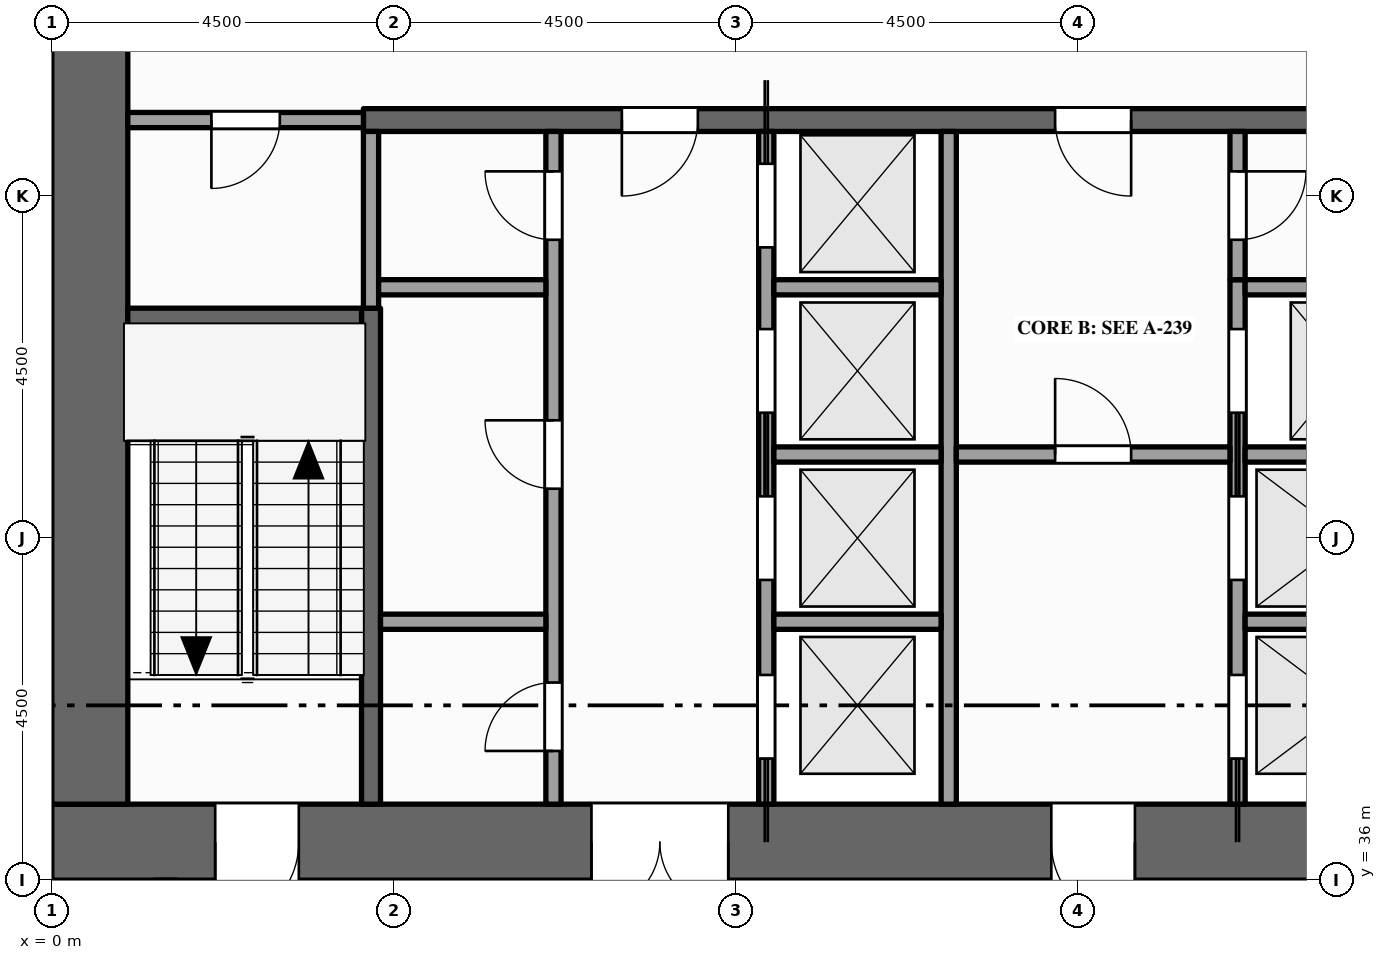
"""IFC4 building model, lengths in metres.
Left out: names, types, materials, properties, quantities, classifications, styles, units other than length and angle.
Written with IfcOpenShell. Run it as: python <this file> out.ifc"""

import sys

from ifc_helpers import new_model, si_unit, direction, frame, frame_2d, origin, place, context, subcontext, project, spatial, rectangle, extrude, element, fill, save


model = new_model("IFC4")
c1 = context("Model", 3, precision=1e-05, world=origin(), true_north=direction((0.0, 1.0)))
c2 = subcontext(c1, "Body", "Model", "MODEL_VIEW")
j1 = project(units=[si_unit("LENGTHUNIT", "METRE"), si_unit("PLANEANGLEUNIT", "RADIAN")], contexts=[c1])
p1 = place(None, origin())
s1 = spatial("IfcSite", under=j1, at=p1, CompositionType="ELEMENT")
p2 = place(p1, origin())
s2 = spatial("IfcBuilding", under=s1, at=p2, CompositionType="ELEMENT")
p3 = place(p2, frame((0.0, 0.0, 215.0)))
s3 = spatial("IfcBuildingStorey", under=s2, at=p3, CompositionType="ELEMENT", Elevation=215.0)
p4 = place(p3, frame((0.0, 36.5, -0.15), z_axis=(0.0, 0.0, 1.0), x_axis=(1.0, 0.0, 0.0)))
e1 = element("IfcWall", 1, at=p4, inside=s3, PredefinedType="SHEAR", context=c2, shape_type="SweptSolid", body=[
    extrude(rectangle(XDim=22.5, YDim=1.0, at=frame_2d((11.25, 0.0))), origin(), (0.0, 0.0, 1.0), 4.0),
])
p5 = place(p4, frame((7.1, 0.0, 0.15)))
e2 = element("IfcOpeningElement", 2, at=p5, cuts=e1, PredefinedType="OPENING", context=c2, shape_type="SweptSolid", body=[
    extrude(rectangle(XDim=1.8, YDim=2.1, at=frame_2d((0.9, 1.05))), frame((0.0, 0.51, 0.0), z_axis=(0.0, -1.0, 0.0), x_axis=(1.0, 0.0, 0.0)), (0.0, 0.0, 1.0), 1.02),
])
p6 = place(p4, frame((13.15, 0.0, 0.15)))
e3 = element("IfcOpeningElement", 3, at=p6, cuts=e1, PredefinedType="OPENING", context=c2, shape_type="SweptSolid", body=[
    extrude(rectangle(XDim=1.1, YDim=2.1, at=frame_2d((0.55, 1.05))), frame((0.0, 0.51, 0.0), z_axis=(0.0, -1.0, 0.0), x_axis=(1.0, 0.0, 0.0)), (0.0, 0.0, 1.0), 1.02),
])
p7 = place(p4, frame((2.15, 0.0, 0.15)))
e4 = element("IfcOpeningElement", 4, at=p7, cuts=e1, PredefinedType="OPENING", context=c2, shape_type="SweptSolid", body=[
    extrude(rectangle(XDim=1.1, YDim=2.1, at=frame_2d((0.55, 1.05))), frame((0.0, 0.51, 0.0), z_axis=(0.0, -1.0, 0.0), x_axis=(1.0, 0.0, 0.0)), (0.0, 0.0, 1.0), 1.02),
])
p8 = place(p4, frame((19.35, 0.0, 0.15)))
e5 = element("IfcOpeningElement", 5, at=p8, cuts=e1, PredefinedType="OPENING", context=c2, shape_type="SweptSolid", body=[
    extrude(rectangle(XDim=1.1, YDim=2.1, at=frame_2d((0.55, 1.05))), frame((0.0, 0.51, 0.0), z_axis=(0.0, -1.0, 0.0), x_axis=(1.0, 0.0, 0.0)), (0.0, 0.0, 1.0), 1.02),
])
p9 = place(p3, frame((0.5, 37.0, -0.15), z_axis=(0.0, 0.0, 1.0), x_axis=(0.0, 1.0, 0.0)))
e6 = element("IfcWall", 6, at=p9, inside=s3, PredefinedType="SHEAR", context=c2, shape_type="SweptSolid", body=[
    extrude(rectangle(XDim=11.5, YDim=1.0, at=frame_2d((5.75, 0.0))), origin(), (0.0, 0.0, 1.0), 4.0),
])
p10 = place(p3, frame((4.2, 37.0, 0.0), z_axis=(0.0, 0.0, 1.0), x_axis=(0.0, 1.0, 0.0)))
e7 = element("IfcWall", 7, at=p10, inside=s3, PredefinedType="SHEAR", context=c2, shape_type="SweptSolid", body=[
    extrude(rectangle(XDim=6.525, YDim=0.25, at=frame_2d((3.262, 0.0))), origin(), (0.0, 0.0, 1.0), 3.85),
])
p11 = place(p3, frame((4.2, 43.525, 0.0), z_axis=(0.0, 0.0, 1.0), x_axis=(0.0, 1.0, 0.0)))
e8 = element("IfcWall", 8, at=p11, inside=s3, PredefinedType="PARTITIONING", context=c2, shape_type="SweptSolid", body=[
    extrude(rectangle(XDim=2.325, YDim=0.2, at=frame_2d((1.163, 0.0))), origin(), (0.0, 0.0, 1.0), 3.85),
])
p12 = place(p3, frame((6.6, 37.0, 0.0), z_axis=(0.0, 0.0, 1.0), x_axis=(0.0, 1.0, 0.0)))
e9 = element("IfcWall", 9, at=p12, inside=s3, PredefinedType="PARTITIONING", context=c2, shape_type="SweptSolid", body=[
    extrude(rectangle(XDim=8.85, YDim=0.2, at=frame_2d((4.425, 0.0))), origin(), (0.0, 0.0, 1.0), 3.85),
])
p13 = place(p12, frame((0.7, 0.0, 0.0)))
e10 = element("IfcOpeningElement", 10, at=p13, cuts=e9, PredefinedType="OPENING", context=c2, shape_type="SweptSolid", body=[
    extrude(rectangle(XDim=0.9, YDim=2.1, at=frame_2d((0.45, 1.05))), frame((0.0, 0.11, 0.0), z_axis=(0.0, -1.0, 0.0), x_axis=(1.0, 0.0, 0.0)), (0.0, 0.0, 1.0), 0.22),
])
p14 = place(p12, frame((4.15, 0.0, 0.0)))
e11 = element("IfcOpeningElement", 11, at=p14, cuts=e9, PredefinedType="OPENING", context=c2, shape_type="SweptSolid", body=[
    extrude(rectangle(XDim=0.9, YDim=2.1, at=frame_2d((0.45, 1.05))), frame((0.0, 0.11, 0.0), z_axis=(0.0, -1.0, 0.0), x_axis=(1.0, 0.0, 0.0)), (0.0, 0.0, 1.0), 0.22),
])
p15 = place(p12, frame((7.425, 0.0, 0.0)))
e12 = element("IfcOpeningElement", 12, at=p15, cuts=e9, PredefinedType="OPENING", context=c2, shape_type="SweptSolid", body=[
    extrude(rectangle(XDim=0.9, YDim=2.1, at=frame_2d((0.45, 1.05))), frame((0.0, 0.11, 0.0), z_axis=(0.0, -1.0, 0.0), x_axis=(1.0, 0.0, 0.0)), (0.0, 0.0, 1.0), 0.22),
])
p16 = place(p3, frame((9.4, 37.0, 0.0), z_axis=(0.0, 0.0, 1.0), x_axis=(0.0, 1.0, 0.0)))
e13 = element("IfcWall", 13, at=p16, inside=s3, PredefinedType="SOLIDWALL", context=c2, shape_type="SweptSolid", body=[
    extrude(rectangle(XDim=8.85, YDim=0.2, at=frame_2d((4.425, 0.0))), origin(), (0.0, 0.0, 1.0), 3.85),
])
p17 = place(p16, frame((0.6, 0.0, 0.012)))
e14 = element("IfcOpeningElement", 14, at=p17, cuts=e13, PredefinedType="OPENING", context=c2, shape_type="SweptSolid", body=[
    extrude(rectangle(XDim=1.1, YDim=2.1, at=frame_2d((0.55, 1.05))), frame((0.0, 0.11, 0.0), z_axis=(0.0, -1.0, 0.0), x_axis=(1.0, 0.0, 0.0)), (0.0, 0.0, 1.0), 0.22),
])
p18 = place(p16, frame((2.95, 0.0, 0.012)))
e15 = element("IfcOpeningElement", 15, at=p18, cuts=e13, PredefinedType="OPENING", context=c2, shape_type="SweptSolid", body=[
    extrude(rectangle(XDim=1.1, YDim=2.1, at=frame_2d((0.55, 1.05))), frame((0.0, 0.11, 0.0), z_axis=(0.0, -1.0, 0.0), x_axis=(1.0, 0.0, 0.0)), (0.0, 0.0, 1.0), 0.22),
])
p19 = place(p16, frame((5.15, 0.0, 0.012)))
e16 = element("IfcOpeningElement", 16, at=p19, cuts=e13, PredefinedType="OPENING", context=c2, shape_type="SweptSolid", body=[
    extrude(rectangle(XDim=1.1, YDim=2.1, at=frame_2d((0.55, 1.05))), frame((0.0, 0.11, 0.0), z_axis=(0.0, -1.0, 0.0), x_axis=(1.0, 0.0, 0.0)), (0.0, 0.0, 1.0), 0.22),
])
p20 = place(p16, frame((7.325, 0.0, 0.012)))
e17 = element("IfcOpeningElement", 17, at=p20, cuts=e13, PredefinedType="OPENING", context=c2, shape_type="SweptSolid", body=[
    extrude(rectangle(XDim=1.1, YDim=2.1, at=frame_2d((0.55, 1.05))), frame((0.0, 0.11, 0.0), z_axis=(0.0, -1.0, 0.0), x_axis=(1.0, 0.0, 0.0)), (0.0, 0.0, 1.0), 0.22),
])
p21 = place(p3, frame((11.8, 37.0, 0.0), z_axis=(0.0, 0.0, 1.0), x_axis=(0.0, 1.0, 0.0)))
e18 = element("IfcWall", 18, at=p21, inside=s3, PredefinedType="SOLIDWALL", context=c2, shape_type="SweptSolid", body=[
    extrude(rectangle(XDim=8.85, YDim=0.2, at=frame_2d((4.425, 0.0))), origin(), (0.0, 0.0, 1.0), 3.85),
])
p22 = place(p3, frame((15.6, 37.0, 0.0), z_axis=(0.0, 0.0, 1.0), x_axis=(0.0, 1.0, 0.0)))
e19 = element("IfcWall", 19, at=p22, inside=s3, PredefinedType="SOLIDWALL", context=c2, shape_type="SweptSolid", body=[
    extrude(rectangle(XDim=6.9, YDim=0.2, at=frame_2d((3.45, 0.0))), origin(), (0.0, 0.0, 1.0), 3.85),
])
p23 = place(p22, frame((0.6, 0.0, 0.012)))
e20 = element("IfcOpeningElement", 20, at=p23, cuts=e19, PredefinedType="OPENING", context=c2, shape_type="SweptSolid", body=[
    extrude(rectangle(XDim=1.1, YDim=2.1, at=frame_2d((0.55, 1.05))), frame((0.0, 0.11, 0.0), z_axis=(0.0, -1.0, 0.0), x_axis=(1.0, 0.0, 0.0)), (0.0, 0.0, 1.0), 0.22),
])
p24 = place(p22, frame((2.95, 0.0, 0.012)))
e21 = element("IfcOpeningElement", 21, at=p24, cuts=e19, PredefinedType="OPENING", context=c2, shape_type="SweptSolid", body=[
    extrude(rectangle(XDim=1.1, YDim=2.1, at=frame_2d((0.55, 1.05))), frame((0.0, 0.11, 0.0), z_axis=(0.0, -1.0, 0.0), x_axis=(1.0, 0.0, 0.0)), (0.0, 0.0, 1.0), 0.22),
])
p25 = place(p22, frame((5.15, 0.0, 0.012)))
e22 = element("IfcOpeningElement", 22, at=p25, cuts=e19, PredefinedType="OPENING", context=c2, shape_type="SweptSolid", body=[
    extrude(rectangle(XDim=1.1, YDim=2.1, at=frame_2d((0.55, 1.05))), frame((0.0, 0.11, 0.0), z_axis=(0.0, -1.0, 0.0), x_axis=(1.0, 0.0, 0.0)), (0.0, 0.0, 1.0), 0.22),
])
p26 = place(p3, frame((15.6, 43.9, 0.0), z_axis=(0.0, 0.0, 1.0), x_axis=(0.0, 1.0, 0.0)))
e23 = element("IfcWall", 23, at=p26, inside=s3, PredefinedType="PARTITIONING", context=c2, shape_type="SweptSolid", body=[
    extrude(rectangle(XDim=1.95, YDim=0.2, at=frame_2d((0.975, 0.0))), origin(), (0.0, 0.0, 1.0), 3.85),
])
p27 = place(p26, frame((0.525, 0.0, 0.0)))
e24 = element("IfcOpeningElement", 24, at=p27, cuts=e23, PredefinedType="OPENING", context=c2, shape_type="SweptSolid", body=[
    extrude(rectangle(XDim=0.9, YDim=2.1, at=frame_2d((0.45, 1.05))), frame((0.0, 0.11, 0.0), z_axis=(0.0, -1.0, 0.0), x_axis=(1.0, 0.0, 0.0)), (0.0, 0.0, 1.0), 0.22),
])
p28 = place(p3, frame((4.325, 39.4, 0.0), z_axis=(0.0, 0.0, 1.0), x_axis=(1.0, 0.0, 0.0)))
e25 = element("IfcWall", 25, at=p28, inside=s3, PredefinedType="PARTITIONING", context=c2, shape_type="SweptSolid", body=[
    extrude(rectangle(XDim=2.175, YDim=0.2, at=frame_2d((1.087, 0.0))), origin(), (0.0, 0.0, 1.0), 3.85),
])
p29 = place(p3, frame((9.5, 39.4, 0.0), z_axis=(0.0, 0.0, 1.0), x_axis=(1.0, 0.0, 0.0)))
e26 = element("IfcWall", 26, at=p29, inside=s3, PredefinedType="SOLIDWALL", context=c2, shape_type="SweptSolid", body=[
    extrude(rectangle(XDim=2.2, YDim=0.2, at=frame_2d((1.1, 0.0))), origin(), (0.0, 0.0, 1.0), 3.85),
])
p30 = place(p3, frame((15.7, 39.4, 0.0), z_axis=(0.0, 0.0, 1.0), x_axis=(1.0, 0.0, 0.0)))
e27 = element("IfcWall", 27, at=p30, inside=s3, PredefinedType="SOLIDWALL", context=c2, shape_type="SweptSolid", body=[
    extrude(rectangle(XDim=2.675, YDim=0.2, at=frame_2d((1.337, 0.0))), origin(), (0.0, 0.0, 1.0), 3.85),
])
p31 = place(p3, frame((9.5, 41.6, 0.0), z_axis=(0.0, 0.0, 1.0), x_axis=(1.0, 0.0, 0.0)))
e28 = element("IfcWall", 28, at=p31, inside=s3, PredefinedType="SOLIDWALL", context=c2, shape_type="SweptSolid", body=[
    extrude(rectangle(XDim=2.2, YDim=0.2, at=frame_2d((1.1, 0.0))), origin(), (0.0, 0.0, 1.0), 3.85),
])
p32 = place(p3, frame((11.9, 41.6, 0.0), z_axis=(0.0, 0.0, 1.0), x_axis=(1.0, 0.0, 0.0)))
e29 = element("IfcWall", 29, at=p32, inside=s3, PredefinedType="PARTITIONING", context=c2, shape_type="SweptSolid", body=[
    extrude(rectangle(XDim=3.6, YDim=0.2, at=frame_2d((1.8, 0.0))), origin(), (0.0, 0.0, 1.0), 3.85),
])
p33 = place(p32, frame((1.3, 0.0, 0.0)))
e30 = element("IfcOpeningElement", 30, at=p33, cuts=e29, PredefinedType="OPENING", context=c2, shape_type="SweptSolid", body=[
    extrude(rectangle(XDim=1.0, YDim=2.1, at=frame_2d((0.5, 1.05))), frame((0.0, 0.11, 0.0), z_axis=(0.0, -1.0, 0.0), x_axis=(1.0, 0.0, 0.0)), (0.0, 0.0, 1.0), 0.22),
])
p34 = place(p3, frame((15.7, 41.6, 0.0), z_axis=(0.0, 0.0, 1.0), x_axis=(1.0, 0.0, 0.0)))
e31 = element("IfcWall", 31, at=p34, inside=s3, PredefinedType="SOLIDWALL", context=c2, shape_type="SweptSolid", body=[
    extrude(rectangle(XDim=2.675, YDim=0.2, at=frame_2d((1.337, 0.0))), origin(), (0.0, 0.0, 1.0), 3.85),
])
p35 = place(p3, frame((1.0, 43.4, 0.0), z_axis=(0.0, 0.0, 1.0), x_axis=(1.0, 0.0, 0.0)))
e32 = element("IfcWall", 32, at=p35, inside=s3, PredefinedType="SHEAR", context=c2, shape_type="SweptSolid", body=[
    extrude(rectangle(XDim=3.075, YDim=0.25, at=frame_2d((1.538, 0.0))), origin(), (0.0, 0.0, 1.0), 3.85),
])
p36 = place(p3, frame((4.3, 43.8, 0.0), z_axis=(0.0, 0.0, 1.0), x_axis=(1.0, 0.0, 0.0)))
e33 = element("IfcWall", 33, at=p36, inside=s3, PredefinedType="PARTITIONING", context=c2, shape_type="SweptSolid", body=[
    extrude(rectangle(XDim=2.2, YDim=0.2, at=frame_2d((1.1, 0.0))), origin(), (0.0, 0.0, 1.0), 3.85),
])
p37 = place(p3, frame((9.5, 43.8, 0.0), z_axis=(0.0, 0.0, 1.0), x_axis=(1.0, 0.0, 0.0)))
e34 = element("IfcWall", 34, at=p37, inside=s3, PredefinedType="SOLIDWALL", context=c2, shape_type="SweptSolid", body=[
    extrude(rectangle(XDim=2.2, YDim=0.2, at=frame_2d((1.1, 0.0))), origin(), (0.0, 0.0, 1.0), 3.85),
])
p38 = place(p3, frame((15.7, 43.8, 0.0), z_axis=(0.0, 0.0, 1.0), x_axis=(1.0, 0.0, 0.0)))
e35 = element("IfcWall", 35, at=p38, inside=s3, PredefinedType="SOLIDWALL", context=c2, shape_type="SweptSolid", body=[
    extrude(rectangle(XDim=2.7, YDim=0.2, at=frame_2d((1.35, 0.0))), origin(), (0.0, 0.0, 1.0), 3.85),
])
p39 = place(p3, frame((1.0, 46.0, 0.0), z_axis=(0.0, 0.0, 1.0), x_axis=(1.0, 0.0, 0.0)))
e36 = element("IfcWall", 36, at=p39, inside=s3, PredefinedType="PARTITIONING", context=c2, shape_type="SweptSolid", body=[
    extrude(rectangle(XDim=3.1, YDim=0.2, at=frame_2d((1.55, 0.0))), origin(), (0.0, 0.0, 1.0), 3.85),
])
p40 = place(p39, frame((1.1, 0.0, 0.0)))
e37 = element("IfcOpeningElement", 37, at=p40, cuts=e36, PredefinedType="OPENING", context=c2, shape_type="SweptSolid", body=[
    extrude(rectangle(XDim=0.9, YDim=2.1, at=frame_2d((0.45, 1.05))), frame((0.0, 0.11, 0.0), z_axis=(0.0, -1.0, 0.0), x_axis=(1.0, 0.0, 0.0)), (0.0, 0.0, 1.0), 0.22),
])
p41 = place(p3, frame((4.1, 46.0, 0.0), z_axis=(0.0, 0.0, 1.0), x_axis=(1.0, 0.0, 0.0)))
e38 = element("IfcWall", 38, at=p41, inside=s3, PredefinedType="SHEAR", context=c2, shape_type="SweptSolid", body=[
    extrude(rectangle(XDim=14.5, YDim=0.3, at=frame_2d((7.25, 0.0))), origin(), (0.0, 0.0, 1.0), 3.85),
])
p42 = place(p41, frame((3.4, 0.0, 0.0)))
e39 = element("IfcOpeningElement", 39, at=p42, cuts=e38, PredefinedType="OPENING", context=c2, shape_type="SweptSolid", body=[
    extrude(rectangle(XDim=1.0, YDim=2.1, at=frame_2d((0.5, 1.05))), frame((0.0, 0.16, 0.0), z_axis=(0.0, -1.0, 0.0), x_axis=(1.0, 0.0, 0.0)), (0.0, 0.0, 1.0), 0.32),
])
p43 = place(p41, frame((9.1, 0.0, 0.0)))
e40 = element("IfcOpeningElement", 40, at=p43, cuts=e38, PredefinedType="OPENING", context=c2, shape_type="SweptSolid", body=[
    extrude(rectangle(XDim=1.0, YDim=2.1, at=frame_2d((0.5, 1.05))), frame((0.0, 0.16, 0.0), z_axis=(0.0, -1.0, 0.0), x_axis=(1.0, 0.0, 0.0)), (0.0, 0.0, 1.0), 0.32),
])
p44 = place(p17, origin())
e41 = element("IfcDoor", 41, at=p44, inside=s3, OperationType="SLIDING_TO_LEFT", PredefinedType="DOOR", context=c2, shape_type="SweptSolid", body=[
    extrude(rectangle(XDim=1.1, YDim=2.1, at=frame_2d((0.55, 1.05))), frame((0.0, 0.025, 0.0), z_axis=(0.0, -1.0, 0.0), x_axis=(1.0, 0.0, 0.0)), (0.0, 0.0, 1.0), 0.05),
])
fill(e14, e41)
p45 = place(p18, origin())
e42 = element("IfcDoor", 42, at=p45, inside=s3, OperationType="SLIDING_TO_RIGHT", PredefinedType="DOOR", context=c2, shape_type="SweptSolid", body=[
    extrude(rectangle(XDim=1.1, YDim=2.1, at=frame_2d((0.55, 1.05))), frame((0.0, 0.025, 0.0), z_axis=(0.0, -1.0, 0.0), x_axis=(1.0, 0.0, 0.0)), (0.0, 0.0, 1.0), 0.05),
])
fill(e15, e42)
p46 = place(p19, origin())
e43 = element("IfcDoor", 43, at=p46, inside=s3, OperationType="SLIDING_TO_LEFT", PredefinedType="DOOR", context=c2, shape_type="SweptSolid", body=[
    extrude(rectangle(XDim=1.1, YDim=2.1, at=frame_2d((0.55, 1.05))), frame((0.0, 0.025, 0.0), z_axis=(0.0, -1.0, 0.0), x_axis=(1.0, 0.0, 0.0)), (0.0, 0.0, 1.0), 0.05),
])
fill(e16, e43)
p47 = place(p20, origin())
e44 = element("IfcDoor", 44, at=p47, inside=s3, OperationType="SLIDING_TO_RIGHT", PredefinedType="DOOR", context=c2, shape_type="SweptSolid", body=[
    extrude(rectangle(XDim=1.1, YDim=2.1, at=frame_2d((0.55, 1.05))), frame((0.0, 0.025, 0.0), z_axis=(0.0, -1.0, 0.0), x_axis=(1.0, 0.0, 0.0)), (0.0, 0.0, 1.0), 0.05),
])
fill(e17, e44)
p48 = place(p23, origin())
e45 = element("IfcDoor", 45, at=p48, inside=s3, OperationType="SLIDING_TO_LEFT", PredefinedType="DOOR", context=c2, shape_type="SweptSolid", body=[
    extrude(rectangle(XDim=1.1, YDim=2.1, at=frame_2d((0.55, 1.05))), frame((0.0, 0.025, 0.0), z_axis=(0.0, -1.0, 0.0), x_axis=(1.0, 0.0, 0.0)), (0.0, 0.0, 1.0), 0.05),
])
fill(e20, e45)
p49 = place(p24, origin())
e46 = element("IfcDoor", 46, at=p49, inside=s3, OperationType="SLIDING_TO_RIGHT", PredefinedType="DOOR", context=c2, shape_type="SweptSolid", body=[
    extrude(rectangle(XDim=1.1, YDim=2.1, at=frame_2d((0.55, 1.05))), frame((0.0, 0.025, 0.0), z_axis=(0.0, -1.0, 0.0), x_axis=(1.0, 0.0, 0.0)), (0.0, 0.0, 1.0), 0.05),
])
fill(e21, e46)
p50 = place(p25, origin())
e47 = element("IfcDoor", 47, at=p50, inside=s3, OperationType="SLIDING_TO_LEFT", PredefinedType="DOOR", context=c2, shape_type="SweptSolid", body=[
    extrude(rectangle(XDim=1.1, YDim=2.1, at=frame_2d((0.55, 1.05))), frame((0.0, 0.025, 0.0), z_axis=(0.0, -1.0, 0.0), x_axis=(1.0, 0.0, 0.0)), (0.0, 0.0, 1.0), 0.05),
])
fill(e22, e47)
p51 = place(p5, origin())
e48 = element("IfcDoor", 48, at=p51, inside=s3, OperationType="DOUBLE_DOOR_SINGLE_SWING", PredefinedType="DOOR", context=c2, shape_type="SweptSolid", body=[
    extrude(rectangle(XDim=1.8, YDim=2.1, at=frame_2d((0.9, 1.05))), frame((0.0, 0.025, 0.0), z_axis=(0.0, -1.0, 0.0), x_axis=(1.0, 0.0, 0.0)), (0.0, 0.0, 1.0), 0.05),
])
fill(e2, e48)
p52 = place(p42, origin())
e49 = element("IfcDoor", 49, at=p52, inside=s3, OperationType="SINGLE_SWING_LEFT", PredefinedType="DOOR", context=c2, shape_type="SweptSolid", body=[
    extrude(rectangle(XDim=1.0, YDim=2.1, at=frame_2d((0.5, 1.05))), frame((0.0, 0.025, 0.0), z_axis=(0.0, -1.0, 0.0), x_axis=(1.0, 0.0, 0.0)), (0.0, 0.0, 1.0), 0.05),
])
fill(e39, e49)
p53 = place(p6, origin())
e50 = element("IfcDoor", 50, at=p53, inside=s3, OperationType="SINGLE_SWING_RIGHT", PredefinedType="DOOR", context=c2, shape_type="SweptSolid", body=[
    extrude(rectangle(XDim=1.1, YDim=2.1, at=frame_2d((0.55, 1.05))), frame((0.0, 0.025, 0.0), z_axis=(0.0, -1.0, 0.0), x_axis=(1.0, 0.0, 0.0)), (0.0, 0.0, 1.0), 0.05),
])
fill(e3, e50)
p54 = place(p33, origin())
e51 = element("IfcDoor", 51, at=p54, inside=s3, OperationType="SINGLE_SWING_LEFT", PredefinedType="DOOR", context=c2, shape_type="SweptSolid", body=[
    extrude(rectangle(XDim=1.0, YDim=2.1, at=frame_2d((0.5, 1.05))), frame((0.0, 0.025, 0.0), z_axis=(0.0, -1.0, 0.0), x_axis=(1.0, 0.0, 0.0)), (0.0, 0.0, 1.0), 0.05),
])
fill(e30, e51)
p55 = place(p43, origin())
e52 = element("IfcDoor", 52, at=p55, inside=s3, OperationType="SINGLE_SWING_RIGHT", PredefinedType="DOOR", context=c2, shape_type="SweptSolid", body=[
    extrude(rectangle(XDim=1.0, YDim=2.1, at=frame_2d((0.5, 1.05))), frame((0.0, 0.025, 0.0), z_axis=(0.0, -1.0, 0.0), x_axis=(1.0, 0.0, 0.0)), (0.0, 0.0, 1.0), 0.05),
])
fill(e40, e52)
p56 = place(p7, origin())
e53 = element("IfcDoor", 53, at=p56, inside=s3, OperationType="SINGLE_SWING_LEFT", PredefinedType="DOOR", context=c2, shape_type="SweptSolid", body=[
    extrude(rectangle(XDim=1.1, YDim=2.1, at=frame_2d((0.55, 1.05))), frame((0.0, 0.025, 0.0), z_axis=(0.0, -1.0, 0.0), x_axis=(1.0, 0.0, 0.0)), (0.0, 0.0, 1.0), 0.05),
])
fill(e4, e53)
p57 = place(p40, origin())
e54 = element("IfcDoor", 54, at=p57, inside=s3, OperationType="SINGLE_SWING_LEFT", PredefinedType="DOOR", context=c2, shape_type="SweptSolid", body=[
    extrude(rectangle(XDim=0.9, YDim=2.1, at=frame_2d((0.45, 1.05))), frame((0.0, 0.025, 0.0), z_axis=(0.0, -1.0, 0.0), x_axis=(1.0, 0.0, 0.0)), (0.0, 0.0, 1.0), 0.05),
])
fill(e37, e54)
p58 = place(p13, origin())
e55 = element("IfcDoor", 55, at=p58, inside=s3, OperationType="SINGLE_SWING_LEFT", PredefinedType="DOOR", context=c2, shape_type="SweptSolid", body=[
    extrude(rectangle(XDim=0.9, YDim=2.1, at=frame_2d((0.45, 1.05))), frame((0.0, 0.025, 0.0), z_axis=(0.0, -1.0, 0.0), x_axis=(1.0, 0.0, 0.0)), (0.0, 0.0, 1.0), 0.05),
])
fill(e10, e55)
p59 = place(p14, origin())
e56 = element("IfcDoor", 56, at=p59, inside=s3, OperationType="SINGLE_SWING_RIGHT", PredefinedType="DOOR", context=c2, shape_type="SweptSolid", body=[
    extrude(rectangle(XDim=0.9, YDim=2.1, at=frame_2d((0.45, 1.05))), frame((0.0, 0.025, 0.0), z_axis=(0.0, -1.0, 0.0), x_axis=(1.0, 0.0, 0.0)), (0.0, 0.0, 1.0), 0.05),
])
fill(e11, e56)
p60 = place(p15, origin())
e57 = element("IfcDoor", 57, at=p60, inside=s3, OperationType="SINGLE_SWING_RIGHT", PredefinedType="DOOR", context=c2, shape_type="SweptSolid", body=[
    extrude(rectangle(XDim=0.9, YDim=2.1, at=frame_2d((0.45, 1.05))), frame((0.0, 0.025, 0.0), z_axis=(0.0, -1.0, 0.0), x_axis=(1.0, 0.0, 0.0)), (0.0, 0.0, 1.0), 0.05),
])
fill(e12, e57)
p61 = place(p27, origin())
e58 = element("IfcDoor", 58, at=p61, inside=s3, OperationType="SINGLE_SWING_RIGHT", PredefinedType="DOOR", context=c2, shape_type="SweptSolid", body=[
    extrude(rectangle(XDim=0.9, YDim=2.1, at=frame_2d((0.45, 1.05))), frame((0.0, 0.025, 0.0), z_axis=(0.0, -1.0, 0.0), x_axis=(1.0, 0.0, 0.0)), (0.0, 0.0, 1.0), 0.05),
])
fill(e24, e58)
save(model, sys.argv[1])
